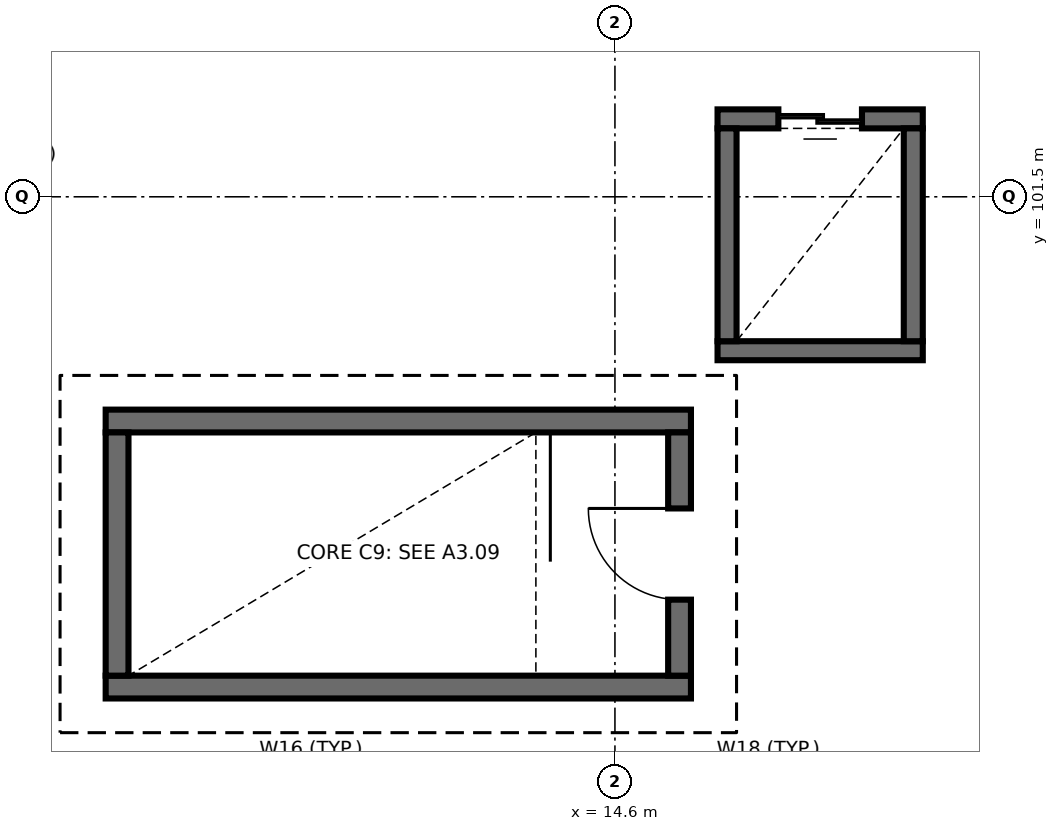
"""IFC4 building model, lengths in metres.
Left out: names, types, materials, properties, quantities, classifications, styles, units other than length and angle.
Written with IfcOpenShell. Run it as: python <this file> out.ifc"""

import sys

from ifc_helpers import new_model, si_unit, direction, frame, frame_2d, origin, place, context, subcontext, project, spatial, rectangle, extrude, element, fill, save


model = new_model("IFC4")
c1 = context("Model", 3, precision=1e-05, world=origin(), true_north=direction((0.0, 1.0)))
c2 = subcontext(c1, "Body", "Model", "MODEL_VIEW")
j1 = project(units=[si_unit("LENGTHUNIT", "METRE"), si_unit("PLANEANGLEUNIT", "RADIAN")], contexts=[c1])
p1 = place(None, origin())
s1 = spatial("IfcSite", under=j1, at=p1, CompositionType="ELEMENT")
p2 = place(p1, origin())
s2 = spatial("IfcBuilding", under=s1, at=p2, CompositionType="ELEMENT")
p3 = place(p2, frame((0.0, 0.0, 26.7)))
s3 = spatial("IfcBuildingStorey", under=s2, at=p3, CompositionType="ELEMENT", Elevation=26.7)
for number, where, z_axis, x_axis in (
    (1, (7.9, 95.05, 0.0), (0.0, 0.0, 1.0), (1.0, 0.0, 0.0)),
    (2, (15.6, 98.55, 0.0), (0.0, 0.0, 1.0), (-1.0, 0.0, 0.0)),
):
    element("IfcWall", number, at=place(p3, frame(where, z_axis=z_axis, x_axis=x_axis)), inside=s3, PredefinedType="SHEAR", context=c2, shape_type="SweptSolid", body=[
        extrude(rectangle(XDim=7.7, YDim=0.3, at=frame_2d((3.85, 0.0))), origin(), (0.0, 0.0, 1.0), 3.9),
    ])
p4 = place(p3, frame((8.05, 98.4, 0.0), z_axis=(0.0, 0.0, 1.0), x_axis=(0.0, -1.0, 0.0)))
e3 = element("IfcWall", 3, at=p4, inside=s3, PredefinedType="SHEAR", context=c2, shape_type="SweptSolid", body=[
    extrude(rectangle(XDim=3.2, YDim=0.3, at=frame_2d((1.6, 0.0))), origin(), (0.0, 0.0, 1.0), 3.9),
])
p5 = place(p3, frame((15.45, 95.2, 0.0), z_axis=(0.0, 0.0, 1.0), x_axis=(0.0, 1.0, 0.0)))
e4 = element("IfcWall", 4, at=p5, inside=s3, PredefinedType="SHEAR", context=c2, shape_type="SweptSolid", body=[
    extrude(rectangle(XDim=3.2, YDim=0.3, at=frame_2d((1.6, 0.0))), origin(), (0.0, 0.0, 1.0), 3.9),
])
p6 = place(p5, frame((1.0, 0.0, 0.0)))
e5 = element("IfcOpeningElement", 5, at=p6, cuts=e4, PredefinedType="OPENING", context=c2, shape_type="SweptSolid", body=[
    extrude(rectangle(XDim=1.2, YDim=2.15, at=frame_2d((0.6, 1.075))), frame((0.0, 0.16, 0.0), z_axis=(0.0, -1.0, 0.0), x_axis=(1.0, 0.0, 0.0)), (0.0, 0.0, 1.0), 0.32),
])
p7 = place(p3, frame((15.95, 99.475, 0.0), z_axis=(0.0, 0.0, 1.0), x_axis=(1.0, 0.0, 0.0)))
e6 = element("IfcWall", 6, at=p7, inside=s3, PredefinedType="SHEAR", context=c2, shape_type="SweptSolid", body=[
    extrude(rectangle(XDim=2.7, YDim=0.25, at=frame_2d((1.35, 0.0))), origin(), (0.0, 0.0, 1.0), 3.9),
])
p8 = place(p3, frame((18.65, 102.525, 0.0), z_axis=(0.0, 0.0, 1.0), x_axis=(-1.0, 0.0, 0.0)))
e7 = element("IfcWall", 7, at=p8, inside=s3, PredefinedType="SHEAR", context=c2, shape_type="SweptSolid", body=[
    extrude(rectangle(XDim=2.7, YDim=0.25, at=frame_2d((1.35, 0.0))), origin(), (0.0, 0.0, 1.0), 3.9),
])
p9 = place(p8, frame((0.8, 0.0, 0.0)))
e8 = element("IfcOpeningElement", 8, at=p9, cuts=e7, PredefinedType="OPENING", context=c2, shape_type="SweptSolid", body=[
    extrude(rectangle(XDim=1.1, YDim=2.15, at=frame_2d((0.55, 1.075))), frame((0.0, 0.135, 0.0), z_axis=(0.0, -1.0, 0.0), x_axis=(1.0, 0.0, 0.0)), (0.0, 0.0, 1.0), 0.27),
])
for number, where, z_axis, x_axis in (
    (9, (16.075, 102.4, 0.0), (0.0, 0.0, 1.0), (0.0, -1.0, 0.0)),
    (10, (18.525, 99.6, 0.0), (0.0, 0.0, 1.0), (0.0, 1.0, 0.0)),
):
    element("IfcWall", number, at=place(p3, frame(where, z_axis=z_axis, x_axis=x_axis)), inside=s3, PredefinedType="SHEAR", context=c2, shape_type="SweptSolid", body=[
        extrude(rectangle(XDim=2.8, YDim=0.25, at=frame_2d((1.4, 0.0))), origin(), (0.0, 0.0, 1.0), 3.9),
    ])
p10 = place(p6, origin())
e11 = element("IfcDoor", 11, at=p10, inside=s3, OperationType="SINGLE_SWING_RIGHT", PredefinedType="DOOR", context=c2, shape_type="SweptSolid", body=[
    extrude(rectangle(XDim=1.2, YDim=2.15, at=frame_2d((0.6, 1.075))), frame((0.0, 0.025, 0.0), z_axis=(0.0, -1.0, 0.0), x_axis=(1.0, 0.0, 0.0)), (0.0, 0.0, 1.0), 0.05),
])
fill(e5, e11)
p11 = place(p9, origin())
e12 = element("IfcDoor", 12, at=p11, inside=s3, OperationType="DOUBLE_DOOR_SLIDING", PredefinedType="DOOR", context=c2, shape_type="SweptSolid", body=[
    extrude(rectangle(XDim=1.1, YDim=2.15, at=frame_2d((0.55, 1.075))), frame((0.0, 0.025, 0.0), z_axis=(0.0, -1.0, 0.0), x_axis=(1.0, 0.0, 0.0)), (0.0, 0.0, 1.0), 0.05),
])
fill(e8, e12)
save(model, sys.argv[1])
